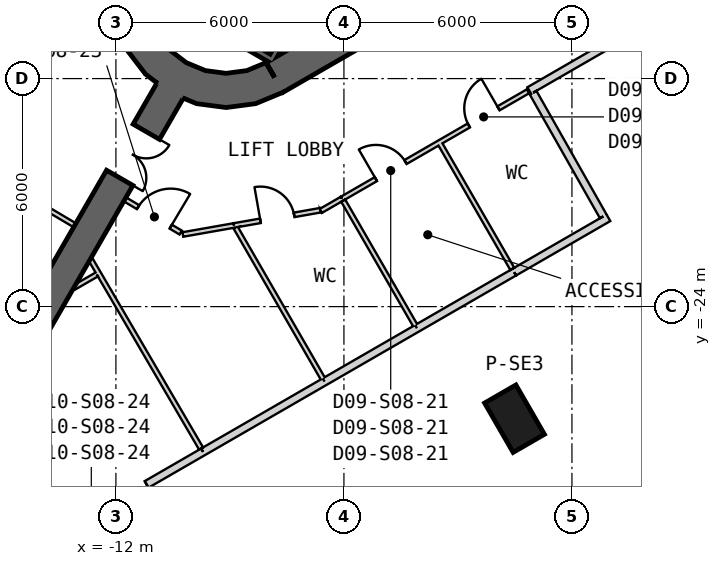
"""IFC4 building model, lengths in metres.
Left out: names, types, materials, properties, quantities, classifications, styles, units other than length and angle.
Written with IfcOpenShell. Run it as: python <this file> out.ifc"""

import sys

from ifc_helpers import new_model, si_unit, direction, frame, frame_2d, origin, origin_2d, place, context, subcontext, project, spatial, polyline, rectangle, outline, extrude, element, fill, save


model = new_model("IFC4")
c1 = context("Model", 3, precision=1e-05, world=origin(), true_north=direction((0.0, 1.0)))
c2 = subcontext(c1, "Body", "Model", "MODEL_VIEW")
j1 = project(units=[si_unit("LENGTHUNIT", "METRE"), si_unit("PLANEANGLEUNIT", "RADIAN")], contexts=[c1])
p1 = place(None, origin())
s1 = spatial("IfcSite", under=j1, at=p1, CompositionType="ELEMENT")
p2 = place(p1, origin())
s2 = spatial("IfcBuilding", under=s1, at=p2, CompositionType="ELEMENT")
p3 = place(p2, frame((0.0, 0.0, 143.9)))
s3 = spatial("IfcBuildingStorey", under=s2, at=p3, CompositionType="ELEMENT", Elevation=143.9)
p4 = place(p3, frame((-1.511, -26.948, 0.0), z_axis=(0.0, 0.0, 1.0), x_axis=(0.5, -0.866025403784, 0.0)))
e1 = element("IfcColumn", 1, at=p4, inside=s3, PredefinedType="COLUMN", context=c2, shape_type="SweptSolid", body=[
    extrude(rectangle(XDim=1.5, YDim=0.95, at=origin_2d()), origin(), (0.0, 0.0, 1.0), 4.1),
])
p5 = place(p3, frame((-7.825, -17.97, 0.0), z_axis=(0.0, 0.0, 1.0), x_axis=(0.866028369851, 0.499994862586, 0.0)))
e2 = element("IfcWall", 2, at=p5, inside=s3, PredefinedType="SHEAR", context=c2, shape_type="SweptSolid", body=[
    extrude(rectangle(XDim=31.523, YDim=0.9, at=frame_2d((15.762, 0.0))), origin(), (0.0, 0.0, 1.0), 4.1),
])
p6 = place(p5, frame((7.062, 0.0, 0.0)))
e3 = element("IfcOpeningElement", 3, at=p6, cuts=e2, PredefinedType="OPENING", context=c2, shape_type="SweptSolid", body=[
    extrude(rectangle(XDim=1.2, YDim=2.4, at=frame_2d((0.6, 1.2))), frame((0.0, 0.46, 0.0), z_axis=(0.0, -1.0, 0.0), x_axis=(1.0, 0.0, 0.0)), (0.0, 0.0, 1.0), 0.92),
])
p7 = place(p5, frame((9.762, 0.0, 0.0)))
e4 = element("IfcOpeningElement", 4, at=p7, cuts=e2, PredefinedType="OPENING", context=c2, shape_type="SweptSolid", body=[
    extrude(rectangle(XDim=1.2, YDim=2.4, at=frame_2d((0.6, 1.2))), frame((0.0, 0.46, 0.0), z_axis=(0.0, -1.0, 0.0), x_axis=(1.0, 0.0, 0.0)), (0.0, 0.0, 1.0), 0.92),
])
p8 = place(p5, frame((12.462, 0.0, 0.0)))
e5 = element("IfcOpeningElement", 5, at=p8, cuts=e2, PredefinedType="OPENING", context=c2, shape_type="SweptSolid", body=[
    extrude(rectangle(XDim=1.2, YDim=2.4, at=frame_2d((0.6, 1.2))), frame((0.0, 0.46, 0.0), z_axis=(0.0, -1.0, 0.0), x_axis=(1.0, 0.0, 0.0)), (0.0, 0.0, 1.0), 0.92),
])
p9 = place(p5, frame((15.162, 0.0, 0.0)))
e6 = element("IfcOpeningElement", 6, at=p9, cuts=e2, PredefinedType="OPENING", context=c2, shape_type="SweptSolid", body=[
    extrude(rectangle(XDim=1.2, YDim=2.4, at=frame_2d((0.6, 1.2))), frame((0.0, 0.46, 0.0), z_axis=(0.0, -1.0, 0.0), x_axis=(1.0, 0.0, 0.0)), (0.0, 0.0, 1.0), 0.92),
])
p10 = place(p5, frame((17.862, 0.0, 0.0)))
e7 = element("IfcOpeningElement", 7, at=p10, cuts=e2, PredefinedType="OPENING", context=c2, shape_type="SweptSolid", body=[
    extrude(rectangle(XDim=1.2, YDim=2.4, at=frame_2d((0.6, 1.2))), frame((0.0, 0.46, 0.0), z_axis=(0.0, -1.0, 0.0), x_axis=(1.0, 0.0, 0.0)), (0.0, 0.0, 1.0), 0.92),
])
p11 = place(p5, frame((20.562, 0.0, 0.0)))
e8 = element("IfcOpeningElement", 8, at=p11, cuts=e2, PredefinedType="OPENING", context=c2, shape_type="SweptSolid", body=[
    extrude(rectangle(XDim=1.2, YDim=2.4, at=frame_2d((0.6, 1.2))), frame((0.0, 0.46, 0.0), z_axis=(0.0, -1.0, 0.0), x_axis=(1.0, 0.0, 0.0)), (0.0, 0.0, 1.0), 0.92),
])
p12 = place(p5, frame((26.712, 0.0, 0.0)))
e9 = element("IfcOpeningElement", 9, at=p12, cuts=e2, PredefinedType="OPENING", context=c2, shape_type="SweptSolid", body=[
    extrude(rectangle(XDim=1.2, YDim=2.4, at=frame_2d((0.6, 1.2))), frame((0.0, 0.46, 0.0), z_axis=(0.0, -1.0, 0.0), x_axis=(1.0, 0.0, 0.0)), (0.0, 0.0, 1.0), 0.92),
])
p13 = place(p5, frame((3.612, 0.0, 0.0)))
e10 = element("IfcOpeningElement", 10, at=p13, cuts=e2, PredefinedType="OPENING", context=c2, shape_type="SweptSolid", body=[
    extrude(rectangle(XDim=1.2, YDim=2.4, at=frame_2d((0.6, 1.2))), frame((0.0, 0.46, 0.0), z_axis=(0.0, -1.0, 0.0), x_axis=(1.0, 0.0, 0.0)), (0.0, 0.0, 1.0), 0.92),
])
p14 = place(p3, origin())
e11 = element("IfcWall", 11, at=p14, inside=s3, PredefinedType="SHEAR", context=c2, shape_type="SweptSolid", body=[
    extrude(outline(polyline([(-12.1, -15.762), (-11.998, -16.538), (-11.698, -17.262), (-11.221, -17.883), (-10.6, -18.36), (-9.876, -18.659), (-9.1, -18.762), (-8.323, -18.659), (-7.6, -18.36), (-8.05, -17.58), (-8.556, -17.79), (-9.1, -17.862), (-9.644, -17.79), (-10.15, -17.58), (-10.585, -17.247), (-10.919, -16.812), (-11.128, -16.305), (-11.2, -15.762), (-12.1, -15.762)])), origin(), (0.0, 0.0, 1.0), 4.1),
])
p15 = place(p3, frame((-10.575, -18.316, 0.0), z_axis=(0.0, 0.0, 1.0), x_axis=(-0.500002326941, -0.86602406032, 0.0)))
e12 = element("IfcWall", 12, at=p15, inside=s3, PredefinedType="SHEAR", context=c2, shape_type="SweptSolid", body=[
    extrude(rectangle(XDim=12.384, YDim=0.8, at=frame_2d((6.192, 0.0))), origin(), (0.0, 0.0, 1.0), 4.1),
])
p16 = place(p15, frame((1.25, 0.0, 0.0)))
e13 = element("IfcOpeningElement", 13, at=p16, cuts=e12, PredefinedType="OPENING", context=c2, shape_type="SweptSolid", body=[
    extrude(rectangle(XDim=1.4, YDim=2.4, at=frame_2d((0.7, 1.2))), frame((0.0, 0.41, 0.0), z_axis=(0.0, -1.0, 0.0), x_axis=(1.0, 0.0, 0.0)), (0.0, 0.0, 1.0), 0.82),
])
p17 = place(p3, frame((-3.905, -10.563, -0.3), z_axis=(0.0, 0.0, 1.0), x_axis=(-0.500012932018, -0.866017937352, 0.0)))
e14 = element("IfcWall", 14, at=p17, inside=s3, PredefinedType="SHEAR", context=c2, shape_type="SweptSolid", body=[
    extrude(rectangle(XDim=8.1, YDim=0.2, at=frame_2d((4.05, 0.0))), origin(), (0.0, 0.0, 1.0), 4.1),
])
p18 = place(p3, frame((-11.282, -15.541, -0.3), z_axis=(0.0, 0.0, 1.0), x_axis=(0.866000483506, -0.500043160704, 0.0)))
e15 = element("IfcWall", 15, at=p18, inside=s3, PredefinedType="SHEAR", context=c2, shape_type="SweptSolid", body=[
    extrude(rectangle(XDim=3.8, YDim=0.2, at=frame_2d((1.9, 0.0))), origin(), (0.0, 0.0, 1.0), 4.1),
])
p19 = place(p3, frame((-14.983, -20.732, 0.0), z_axis=(0.0, 0.0, 1.0), x_axis=(0.860268204019, -0.509841756973, 0.0)))
e16 = element("IfcWall", 16, at=p19, inside=s3, PredefinedType="PARTITIONING", context=c2, shape_type="SweptSolid", body=[
    extrude(rectangle(XDim=2.21, YDim=0.12, at=frame_2d((1.105, 0.0))), origin(), (0.0, 0.0, 1.0), 3.8),
])
p20 = place(p3, frame((-1.123, -18.315, 0.0), z_axis=(0.0, 0.0, 1.0), x_axis=(0.866026561282, 0.49999799515, 0.0)))
e17 = element("IfcWall", 17, at=p20, inside=s3, PredefinedType="PARTITIONING", context=c2, shape_type="SweptSolid", body=[
    extrude(rectangle(XDim=26.435, YDim=0.2, at=frame_2d((13.218, 0.0))), origin(), (0.0, 0.0, 1.0), 2.98),
])
p21 = place(p20, frame((12.718, 0.0, 0.0)))
e18 = element("IfcOpeningElement", 18, at=p21, cuts=e17, PredefinedType="OPENING", context=c2, shape_type="SweptSolid", body=[
    extrude(rectangle(XDim=1.0, YDim=2.1, at=frame_2d((0.5, 1.05))), frame((0.0, 0.11, 0.0), z_axis=(0.0, -1.0, 0.0), x_axis=(1.0, 0.0, 0.0)), (0.0, 0.0, 1.0), 0.22),
])
p22 = place(p3, frame((-6.609, -21.483, 0.0), z_axis=(0.0, 0.0, 1.0), x_axis=(0.865865073245, 0.500277597875, 0.0)))
e19 = element("IfcWall", 19, at=p22, inside=s3, PredefinedType="PARTITIONING", context=c2, shape_type="SweptSolid", body=[
    extrude(rectangle(XDim=0.647, YDim=0.12, at=frame_2d((0.324, 0.0))), origin(), (0.0, 0.0, 1.0), 3.8),
])
p23 = place(p3, frame((-6.049, -21.159, 0.0), z_axis=(0.0, 0.0, 1.0), x_axis=(0.866040189422, 0.499974389651, 0.0)))
e20 = element("IfcWall", 20, at=p23, inside=s3, PredefinedType="PARTITIONING", context=c2, shape_type="SweptSolid", body=[
    extrude(rectangle(XDim=5.648, YDim=0.12, at=frame_2d((2.824, 0.0))), origin(), (0.0, 0.0, 1.0), 2.98),
])
p24 = place(p23, frame((3.852, 0.0, 0.0)))
e21 = element("IfcOpeningElement", 21, at=p24, cuts=e20, PredefinedType="OPENING", context=c2, shape_type="SweptSolid", body=[
    extrude(rectangle(XDim=0.9, YDim=2.1, at=frame_2d((0.45, 1.05))), frame((0.0, 0.07, 0.0), z_axis=(0.0, -1.0, 0.0), x_axis=(1.0, 0.0, 0.0)), (0.0, 0.0, 1.0), 0.14),
])
p25 = place(p23, frame((1.028, 0.0, 0.0)))
e22 = element("IfcOpeningElement", 22, at=p25, cuts=e20, PredefinedType="OPENING", context=c2, shape_type="SweptSolid", body=[
    extrude(rectangle(XDim=0.9, YDim=2.1, at=frame_2d((0.45, 1.05))), frame((0.0, 0.07, 0.0), z_axis=(0.0, -1.0, 0.0), x_axis=(1.0, 0.0, 0.0)), (0.0, 0.0, 1.0), 0.14),
])
p26 = place(p3, frame((-10.239, -22.102, 0.0), z_axis=(0.0, 0.0, 1.0), x_axis=(0.984801523662, 0.173683502361, 0.0)))
e23 = element("IfcWall", 23, at=p26, inside=s3, PredefinedType="PARTITIONING", context=c2, shape_type="SweptSolid", body=[
    extrude(rectangle(XDim=1.368, YDim=0.12, at=frame_2d((0.684, 0.0))), origin(), (0.0, 0.0, 1.0), 2.88),
])
p27 = place(p3, frame((-8.892, -21.865, 0.0), z_axis=(0.0, 0.0, 1.0), x_axis=(0.984802696179, 0.17367685395, 0.0)))
e24 = element("IfcWall", 24, at=p27, inside=s3, PredefinedType="PARTITIONING", context=c2, shape_type="SweptSolid", body=[
    extrude(rectangle(XDim=2.311, YDim=0.12, at=frame_2d((1.156, 0.0))), origin(), (0.0, 0.0, 1.0), 3.8),
])
p28 = place(p27, frame((0.706, 0.0, 0.0)))
e25 = element("IfcOpeningElement", 25, at=p28, cuts=e24, PredefinedType="OPENING", context=c2, shape_type="SweptSolid", body=[
    extrude(rectangle(XDim=0.9, YDim=2.1, at=frame_2d((0.45, 1.05))), frame((0.0, 0.07, 0.0), z_axis=(0.0, -1.0, 0.0), x_axis=(1.0, 0.0, 0.0)), (0.0, 0.0, 1.0), 0.14),
])
p29 = place(p3, frame((-11.764, -21.177, 0.0), z_axis=(0.0, 0.0, 1.0), x_axis=(0.859089516353, -0.511825363667, 0.0)))
e26 = element("IfcWall", 26, at=p29, inside=s3, PredefinedType="PARTITIONING", context=c2, shape_type="SweptSolid", body=[
    extrude(rectangle(XDim=1.709, YDim=0.12, at=frame_2d((0.854, 0.0))), origin(), (0.0, 0.0, 1.0), 3.8),
])
p30 = place(p29, frame((0.405, 0.0, 0.0)))
e27 = element("IfcOpeningElement", 27, at=p30, cuts=e26, PredefinedType="OPENING", context=c2, shape_type="SweptSolid", body=[
    extrude(rectangle(XDim=1.0, YDim=2.1, at=frame_2d((0.5, 1.05))), frame((0.0, 0.07, 0.0), z_axis=(0.0, -1.0, 0.0), x_axis=(1.0, 0.0, 0.0)), (0.0, 0.0, 1.0), 0.14),
])
p31 = place(p3, frame((0.96, -21.662, 0.0), z_axis=(0.0, 0.0, 1.0), x_axis=(-0.866040716581, -0.499973476521, 0.0)))
e28 = element("IfcWall", 28, at=p31, inside=s3, PredefinedType="PARTITIONING", context=c2, shape_type="SweptSolid", body=[
    extrude(rectangle(XDim=2.863, YDim=0.2, at=frame_2d((1.431, 0.0))), origin(), (0.0, 0.0, 1.0), 3.08),
])
p32 = place(p3, frame((-1.519, -23.094, 0.0), z_axis=(0.0, 0.0, 1.0), x_axis=(-0.865987495984, -0.500065652488, 0.0)))
e29 = element("IfcWall", 29, at=p32, inside=s3, PredefinedType="PARTITIONING", context=c2, shape_type="SweptSolid", body=[
    extrude(rectangle(XDim=2.956, YDim=0.2, at=frame_2d((1.478, 0.0))), origin(), (0.0, 0.0, 1.0), 3.8),
])
p33 = place(p3, frame((-4.079, -24.572, 0.0), z_axis=(0.0, 0.0, 1.0), x_axis=(-0.8660392398, -0.499976034552, 0.0)))
e30 = element("IfcWall", 30, at=p33, inside=s3, PredefinedType="PARTITIONING", context=c2, shape_type="SweptSolid", body=[
    extrude(rectangle(XDim=2.806, YDim=0.2, at=frame_2d((1.403, 0.0))), origin(), (0.0, 0.0, 1.0), 2.98),
])
p34 = place(p3, frame((-6.509, -25.974, 0.0), z_axis=(0.0, 0.0, 1.0), x_axis=(-0.86602156466, -0.500006649499, 0.0)))
e31 = element("IfcWall", 31, at=p34, inside=s3, PredefinedType="PARTITIONING", context=c2, shape_type="SweptSolid", body=[
    extrude(rectangle(XDim=3.693, YDim=0.2, at=frame_2d((1.847, 0.0))), origin(), (0.0, 0.0, 1.0), 2.98),
])
p35 = place(p3, frame((-9.707, -27.821, 0.0), z_axis=(0.0, 0.0, 1.0), x_axis=(-0.866031500321, -0.49998944034, 0.0)))
e32 = element("IfcWall", 32, at=p35, inside=s3, PredefinedType="PARTITIONING", context=c2, shape_type="SweptSolid", body=[
    extrude(rectangle(XDim=4.433, YDim=0.2, at=frame_2d((2.216, 0.0))), origin(), (0.0, 0.0, 1.0), 2.88),
])
p36 = place(p35, frame((1.716, 0.0, 0.0)))
e33 = element("IfcOpeningElement", 33, at=p36, cuts=e32, PredefinedType="OPENING", context=c2, shape_type="SweptSolid", body=[
    extrude(rectangle(XDim=1.0, YDim=2.1, at=frame_2d((0.5, 1.05))), frame((0.0, 0.11, 0.0), z_axis=(0.0, -1.0, 0.0), x_axis=(1.0, 0.0, 0.0)), (0.0, 0.0, 1.0), 0.22),
])
p37 = place(p3, frame((-1.021, -18.372, 0.0), z_axis=(0.0, 0.0, 1.0), x_axis=(0.493366643235, -0.869821450266, 0.0)))
e34 = element("IfcWall", 34, at=p37, inside=s3, PredefinedType="PARTITIONING", context=c2, shape_type="SweptSolid", body=[
    extrude(rectangle(XDim=3.74, YDim=0.2, at=frame_2d((1.87, 0.0))), origin(), (0.0, 0.0, 1.0), 3.08),
])
p38 = place(p3, frame((-15.286, -27.276, 0.0), z_axis=(0.0, 0.0, 1.0), x_axis=(0.506988383663, -0.861952886666, 0.0)))
e35 = element("IfcWall", 35, at=p38, inside=s3, PredefinedType="PARTITIONING", context=c2, shape_type="SweptSolid", body=[
    extrude(rectangle(XDim=3.361, YDim=0.2, at=frame_2d((1.681, 0.0))), origin(), (0.0, 0.0, 1.0), 3.8),
])
p39 = place(p3, frame((-1.569, -23.007, 0.0), z_axis=(0.0, 0.0, 1.0), x_axis=(-0.499966587594, 0.866044693586, 0.0)))
e36 = element("IfcWall", 36, at=p39, inside=s3, PredefinedType="PARTITIONING", context=c2, shape_type="SweptSolid", body=[
    extrude(rectangle(XDim=3.78, YDim=0.12, at=frame_2d((1.89, 0.0))), origin(), (0.0, 0.0, 1.0), 3.8),
])
p40 = place(p3, frame((-4.129, -24.485, 0.0), z_axis=(0.0, 0.0, 1.0), x_axis=(-0.500015027522, 0.866016727467, 0.0)))
e37 = element("IfcWall", 37, at=p40, inside=s3, PredefinedType="PARTITIONING", context=c2, shape_type="SweptSolid", body=[
    extrude(rectangle(XDim=3.78, YDim=0.12, at=frame_2d((1.89, 0.0))), origin(), (0.0, 0.0, 1.0), 2.98),
])
p41 = place(p3, frame((-6.559, -25.888, 0.0), z_axis=(0.0, 0.0, 1.0), x_axis=(-0.499994486038, 0.866028587248, 0.0)))
e38 = element("IfcWall", 38, at=p41, inside=s3, PredefinedType="PARTITIONING", context=c2, shape_type="SweptSolid", body=[
    extrude(rectangle(XDim=4.583, YDim=0.12, at=frame_2d((2.292, 0.0))), origin(), (0.0, 0.0, 1.0), 2.98),
])
p42 = place(p3, frame((-12.673, -22.75, 0.0), z_axis=(0.0, 0.0, 1.0), x_axis=(0.504751362892, -0.863264769152, 0.0)))
e39 = element("IfcWall", 39, at=p42, inside=s3, PredefinedType="PARTITIONING", context=c2, shape_type="SweptSolid", body=[
    extrude(rectangle(XDim=5.775, YDim=0.12, at=frame_2d((2.887, 0.0))), origin(), (0.0, 0.0, 1.0), 2.88),
])
p43 = place(p3, frame((-12.505, -23.155, 0.0), z_axis=(0.0, 0.0, 1.0), x_axis=(-0.866138803259, -0.49980353489, 0.0)))
e40 = element("IfcWall", 40, at=p43, inside=s3, PredefinedType="PARTITIONING", context=c2, shape_type="SweptSolid", body=[
    extrude(rectangle(XDim=0.695, YDim=0.12, at=frame_2d((0.348, 0.0))), origin(), (0.0, 0.0, 1.0), 3.8),
])
p44 = place(p24, origin())
e41 = element("IfcDoor", 41, at=p44, inside=s3, OperationType="SINGLE_SWING_LEFT", PredefinedType="NOTDEFINED", context=c2, shape_type="SweptSolid", body=[
    extrude(rectangle(XDim=0.9, YDim=2.1, at=frame_2d((0.45, 1.05))), frame((0.0, 0.025, 0.0), z_axis=(0.0, -1.0, 0.0), x_axis=(1.0, 0.0, 0.0)), (0.0, 0.0, 1.0), 0.05),
])
fill(e21, e41)
p45 = place(p25, origin())
e42 = element("IfcDoor", 42, at=p45, inside=s3, OperationType="SINGLE_SWING_RIGHT", PredefinedType="NOTDEFINED", context=c2, shape_type="SweptSolid", body=[
    extrude(rectangle(XDim=0.9, YDim=2.1, at=frame_2d((0.45, 1.05))), frame((0.0, 0.025, 0.0), z_axis=(0.0, -1.0, 0.0), x_axis=(1.0, 0.0, 0.0)), (0.0, 0.0, 1.0), 0.05),
])
fill(e22, e42)
p46 = place(p28, origin())
e43 = element("IfcDoor", 43, at=p46, inside=s3, OperationType="SINGLE_SWING_LEFT", PredefinedType="NOTDEFINED", context=c2, shape_type="SweptSolid", body=[
    extrude(rectangle(XDim=0.9, YDim=2.1, at=frame_2d((0.45, 1.05))), frame((0.0, 0.025, 0.0), z_axis=(0.0, -1.0, 0.0), x_axis=(1.0, 0.0, 0.0)), (0.0, 0.0, 1.0), 0.05),
])
fill(e25, e43)
p47 = place(p30, origin())
e44 = element("IfcDoor", 44, at=p47, inside=s3, OperationType="SINGLE_SWING_LEFT", PredefinedType="NOTDEFINED", context=c2, shape_type="SweptSolid", body=[
    extrude(rectangle(XDim=1.0, YDim=2.1, at=frame_2d((0.5, 1.05))), frame((0.0, 0.025, 0.0), z_axis=(0.0, -1.0, 0.0), x_axis=(1.0, 0.0, 0.0)), (0.0, 0.0, 1.0), 0.05),
])
fill(e27, e44)
p48 = place(p36, origin())
e45 = element("IfcDoor", 45, at=p48, inside=s3, OperationType="SINGLE_SWING_LEFT", PredefinedType="USERDEFINED", context=c2, shape_type="SweptSolid", body=[
    extrude(rectangle(XDim=1.0, YDim=2.1, at=frame_2d((0.5, 1.05))), frame((0.0, 0.025, 0.0), z_axis=(0.0, -1.0, 0.0), x_axis=(1.0, 0.0, 0.0)), (0.0, 0.0, 1.0), 0.05),
])
fill(e33, e45)
p49 = place(p16, origin())
e46 = element("IfcDoor", 46, at=p49, inside=s3, OperationType="DOUBLE_DOOR_SINGLE_SWING", PredefinedType="NOTDEFINED", context=c2, shape_type="SweptSolid", body=[
    extrude(rectangle(XDim=1.4, YDim=2.4, at=frame_2d((0.7, 1.2))), frame((0.0, 0.025, 0.0), z_axis=(0.0, -1.0, 0.0), x_axis=(1.0, 0.0, 0.0)), (0.0, 0.0, 1.0), 0.05),
])
fill(e13, e46)
save(model, sys.argv[1])
